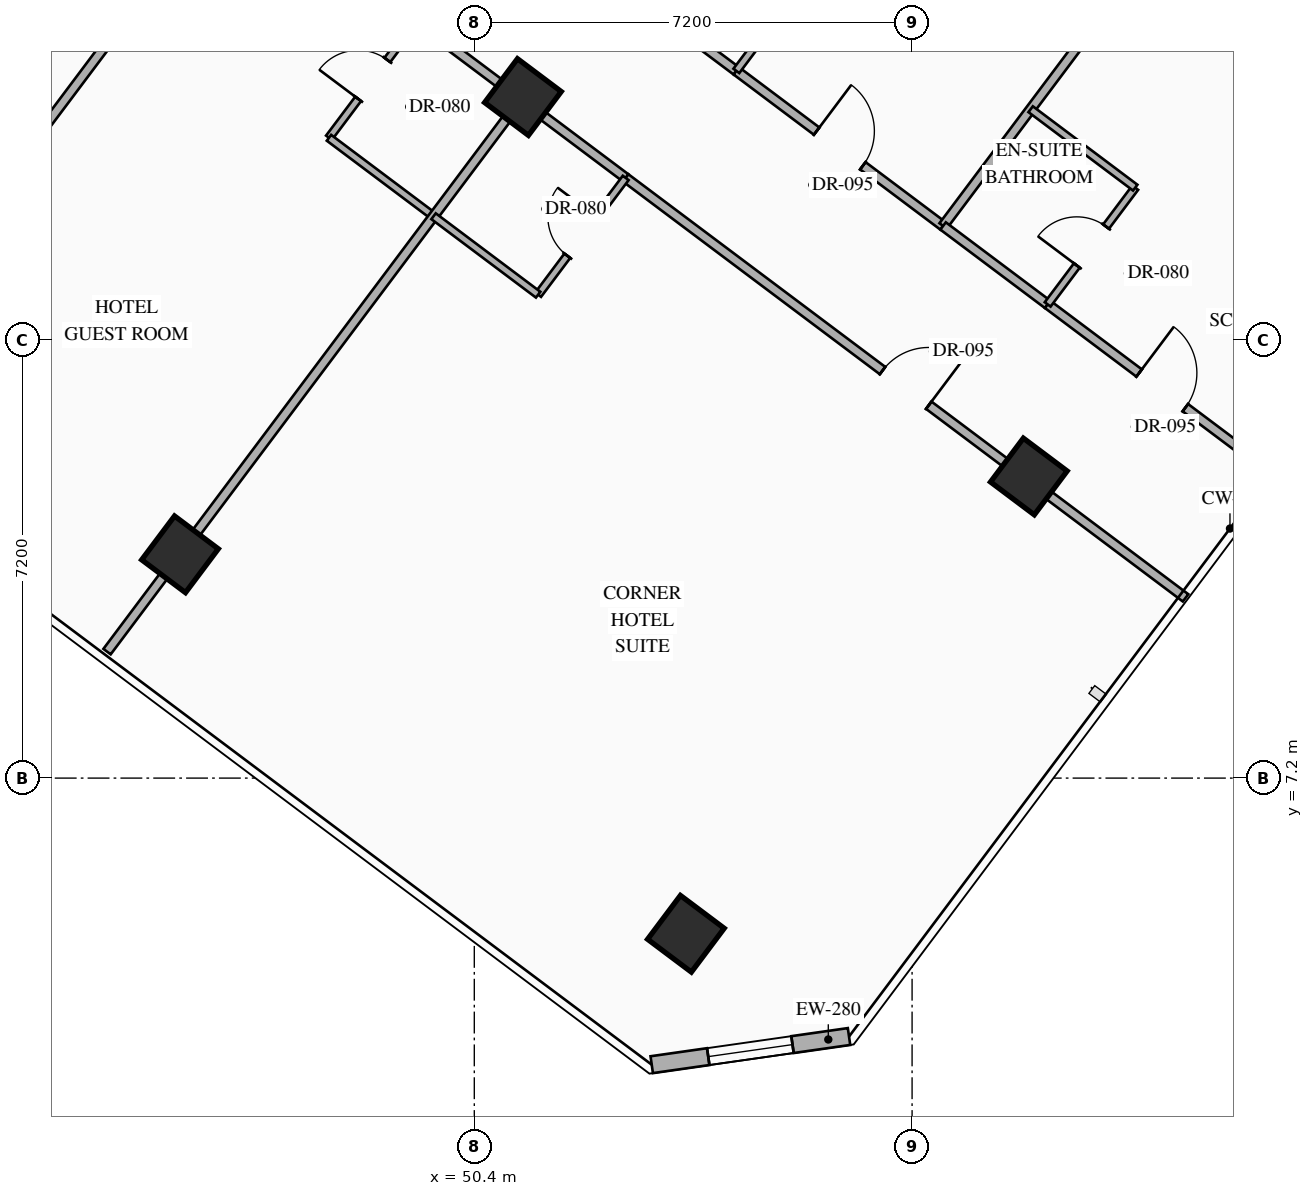
"""IFC4 building model, lengths in metres.
Left out: names, types, materials, properties, quantities, classifications, styles, units other than length and angle.
Written with IfcOpenShell. Run it as: python <this file> out.ifc"""

import sys

from ifc_helpers import new_model, si_unit, direction, frame, frame_2d, origin, origin_2d, place, context, subcontext, project, spatial, rectangle, hollow_rectangle, extrude, element, fill, save


model = new_model("IFC4")
c1 = context("Model", 3, precision=1e-05, world=origin(), true_north=direction((0.0, 1.0)))
c2 = subcontext(c1, "Body", "Model", "MODEL_VIEW")
j1 = project(units=[si_unit("LENGTHUNIT", "METRE"), si_unit("PLANEANGLEUNIT", "RADIAN")], contexts=[c1])
p1 = place(None, origin())
s1 = spatial("IfcSite", under=j1, at=p1, CompositionType="ELEMENT")
p2 = place(p1, origin())
s2 = spatial("IfcBuilding", under=s1, at=p2, CompositionType="ELEMENT")
p3 = place(p2, frame((0.0, 0.0, 70.1)))
s3 = spatial("IfcBuildingStorey", under=s2, at=p3, CompositionType="ELEMENT", Elevation=70.1)
for number, where, z_axis, x_axis in (
    (1, (45.56, 10.88, 0.0), (0.0, 0.0, 1.0), (0.8, -0.6, 0.0)),
    (2, (51.2, 18.4, 0.0), (0.0, 0.0, 1.0), (0.8, -0.6, 0.0)),
    (3, (53.88, 4.64, 0.0), (0.0, 0.0, 1.0), (0.8, -0.6, 0.0)),
    (4, (59.52, 12.16, 0.0), (0.0, 0.0, 1.0), (0.8, -0.6, 0.0)),
):
    element("IfcColumn", number, at=place(p3, frame(where, z_axis=z_axis, x_axis=x_axis)), inside=s3, PredefinedType="COLUMN", context=c2, shape_type="SweptSolid", body=[
        extrude(hollow_rectangle(XDim=0.9, YDim=0.9, WallThickness=0.036, at=origin_2d()), origin(), (0.0, 0.0, 1.0), 4.5),
    ])
p4 = place(p3, frame((56.563, 2.95, 0.0), z_axis=(0.0, 0.0, 1.0), x_axis=(-0.989977778067, -0.141223223777, 0.0)))
e5 = element("IfcWall", 5, at=p4, inside=s3, PredefinedType="STANDARD", context=c2, shape_type="SweptSolid", body=[
    extrude(rectangle(XDim=3.278, YDim=0.28, at=frame_2d((1.639, 0.0))), origin(), (0.0, 0.0, 1.0), 4.28),
])
p5 = place(p4, frame((0.939, 0.0, 0.85)))
e6 = element("IfcOpeningElement", 6, at=p5, cuts=e5, PredefinedType="OPENING", context=c2, shape_type="SweptSolid", body=[
    extrude(rectangle(XDim=1.4, YDim=1.8, at=frame_2d((0.7, 0.9))), frame((0.0, 0.15, 0.0), z_axis=(0.0, -1.0, 0.0), x_axis=(1.0, 0.0, 0.0)), (0.0, 0.0, 1.0), 0.3),
])
p6 = place(p3, frame((39.464, 12.752, 0.0), z_axis=(0.0, 0.0, 1.0), x_axis=(0.6, 0.8, 0.0)))
e7 = element("IfcWall", 7, at=p6, inside=s3, PredefinedType="PARTITIONING", context=c2, shape_type="SweptSolid", body=[
    extrude(rectangle(XDim=11.51, YDim=0.15, at=frame_2d((5.755, 0.0))), origin(), (0.0, 0.0, 1.0), 4.28),
])
p7 = place(p3, frame((52.99, 20.12, 0.0), z_axis=(0.0, 0.0, 1.0), x_axis=(0.79998637334, -0.60001816845, 0.0)))
e8 = element("IfcWall", 8, at=p7, inside=s3, PredefinedType="PARTITIONING", context=c2, shape_type="SweptSolid", body=[
    extrude(rectangle(XDim=2.15, YDim=0.15, at=frame_2d((1.075, 0.0))), origin(), (0.0, 0.0, 1.0), 3.925),
])
p8 = place(p3, frame((54.71, 18.83, 0.0), z_axis=(0.0, 0.0, 1.0), x_axis=(0.800006893092, -0.599990809101, 0.0)))
e9 = element("IfcWall", 9, at=p8, inside=s3, PredefinedType="PARTITIONING", context=c2, shape_type="SweptSolid", body=[
    extrude(rectangle(XDim=4.25, YDim=0.15, at=frame_2d((2.125, 0.0))), origin(), (0.0, 0.0, 1.0), 3.925),
])
p9 = place(p8, frame((1.65, 0.0, 0.0)))
e10 = element("IfcOpeningElement", 10, at=p9, cuts=e9, PredefinedType="OPENING", context=c2, shape_type="SweptSolid", body=[
    extrude(rectangle(XDim=0.95, YDim=2.15, at=frame_2d((0.475, 1.075))), frame((0.0, 0.085, 0.0), z_axis=(0.0, -1.0, 0.0), x_axis=(1.0, 0.0, 0.0)), (0.0, 0.0, 1.0), 0.17),
])
p10 = place(p3, frame((54.71, 18.83, 0.0), z_axis=(0.0, 0.0, 1.0), x_axis=(0.6, 0.8, 0.0)))
e11 = element("IfcWall", 11, at=p10, inside=s3, PredefinedType="PARTITIONING", context=c2, shape_type="SweptSolid", body=[
    extrude(rectangle(XDim=2.4, YDim=0.12, at=frame_2d((1.2, 0.0))), origin(), (0.0, 0.0, 1.0), 4.28),
])
p11 = place(p10, frame((0.8, 0.0, 0.0)))
e12 = element("IfcOpeningElement", 12, at=p11, cuts=e11, PredefinedType="OPENING", context=c2, shape_type="SweptSolid", body=[
    extrude(rectangle(XDim=0.8, YDim=2.06, at=frame_2d((0.4, 1.03))), frame((0.0, 0.07, 0.0), z_axis=(0.0, -1.0, 0.0), x_axis=(1.0, 0.0, 0.0)), (0.0, 0.0, 1.0), 0.14),
])
p12 = place(p3, frame((58.11, 16.28, 0.0), z_axis=(0.0, 0.0, 1.0), x_axis=(0.599996617946, 0.80000253653, 0.0)))
e13 = element("IfcWall", 13, at=p12, inside=s3, PredefinedType="PARTITIONING", context=c2, shape_type="SweptSolid", body=[
    extrude(rectangle(XDim=11.55, YDim=0.15, at=frame_2d((5.775, 0.0))), origin(), (0.0, 0.0, 1.0), 4.28),
])
p13 = place(p3, frame((58.11, 16.28, 0.0), z_axis=(0.0, 0.0, 1.0), x_axis=(0.79998637334, -0.60001816845, 0.0)))
e14 = element("IfcWall", 14, at=p13, inside=s3, PredefinedType="PARTITIONING", context=c2, shape_type="SweptSolid", body=[
    extrude(rectangle(XDim=2.15, YDim=0.15, at=frame_2d((1.075, 0.0))), origin(), (0.0, 0.0, 1.0), 3.925),
])
p14 = place(p3, frame((59.83, 14.99, 0.0), z_axis=(0.0, 0.0, 1.0), x_axis=(0.799993779569, -0.600008293819, 0.0)))
e15 = element("IfcWall", 15, at=p14, inside=s3, PredefinedType="PARTITIONING", context=c2, shape_type="SweptSolid", body=[
    extrude(rectangle(XDim=4.71, YDim=0.15, at=frame_2d((2.355, 0.0))), origin(), (0.0, 0.0, 1.0), 3.925),
])
p15 = place(p14, frame((1.88, 0.0, 0.0)))
e16 = element("IfcOpeningElement", 16, at=p15, cuts=e15, PredefinedType="OPENING", context=c2, shape_type="SweptSolid", body=[
    extrude(rectangle(XDim=0.95, YDim=2.15, at=frame_2d((0.475, 1.075))), frame((0.0, 0.085, 0.0), z_axis=(0.0, -1.0, 0.0), x_axis=(1.0, 0.0, 0.0)), (0.0, 0.0, 1.0), 0.17),
])
p16 = place(p3, frame((59.83, 14.99, 0.0), z_axis=(0.0, 0.0, 1.0), x_axis=(0.6, 0.8, 0.0)))
e17 = element("IfcWall", 17, at=p16, inside=s3, PredefinedType="PARTITIONING", context=c2, shape_type="SweptSolid", body=[
    extrude(rectangle(XDim=2.4, YDim=0.12, at=frame_2d((1.2, 0.0))), origin(), (0.0, 0.0, 1.0), 4.28),
])
p17 = place(p16, frame((0.8, 0.0, 0.0)))
e18 = element("IfcOpeningElement", 18, at=p17, cuts=e17, PredefinedType="OPENING", context=c2, shape_type="SweptSolid", body=[
    extrude(rectangle(XDim=0.8, YDim=2.06, at=frame_2d((0.4, 1.03))), frame((0.0, 0.07, 0.0), z_axis=(0.0, -1.0, 0.0), x_axis=(1.0, 0.0, 0.0)), (0.0, 0.0, 1.0), 0.14),
])
p18 = place(p3, frame((59.55, 18.2, 0.0), z_axis=(0.0, 0.0, 1.0), x_axis=(0.79998637334, -0.60001816845, 0.0)))
e19 = element("IfcWall", 19, at=p18, inside=s3, PredefinedType="PARTITIONING", context=c2, shape_type="SweptSolid", body=[
    extrude(rectangle(XDim=2.15, YDim=0.12, at=frame_2d((1.075, 0.0))), origin(), (0.0, 0.0, 1.0), 4.28),
])
p19 = place(p3, frame((49.45, 19.65, 0.0), z_axis=(0.0, 0.0, 1.0), x_axis=(0.800040880289, -0.59994548908, 0.0)))
e20 = element("IfcWall", 20, at=p19, inside=s3, PredefinedType="PARTITIONING", context=c2, shape_type="SweptSolid", body=[
    extrude(rectangle(XDim=2.15, YDim=0.15, at=frame_2d((1.075, 0.0))), origin(), (0.0, 0.0, 1.0), 3.475),
])
p20 = place(p3, frame((48.01, 17.73, 0.0), z_axis=(0.0, 0.0, 1.0), x_axis=(0.6, 0.8, 0.0)))
e21 = element("IfcWall", 21, at=p20, inside=s3, PredefinedType="PARTITIONING", context=c2, shape_type="SweptSolid", body=[
    extrude(rectangle(XDim=2.4, YDim=0.12, at=frame_2d((1.2, 0.0))), origin(), (0.0, 0.0, 1.0), 4.28),
])
p21 = place(p20, frame((0.8, 0.0, 0.0)))
e22 = element("IfcOpeningElement", 22, at=p21, cuts=e21, PredefinedType="OPENING", context=c2, shape_type="SweptSolid", body=[
    extrude(rectangle(XDim=0.8, YDim=2.06, at=frame_2d((0.4, 1.03))), frame((0.0, 0.07, 0.0), z_axis=(0.0, -1.0, 0.0), x_axis=(1.0, 0.0, 0.0)), (0.0, 0.0, 1.0), 0.14),
])
p22 = place(p3, frame((48.01, 17.73, 0.0), z_axis=(0.0, 0.0, 1.0), x_axis=(0.79998637334, -0.60001816845, 0.0)))
e23 = element("IfcWall", 23, at=p22, inside=s3, PredefinedType="PARTITIONING", context=c2, shape_type="SweptSolid", body=[
    extrude(rectangle(XDim=2.15, YDim=0.12, at=frame_2d((1.075, 0.0))), origin(), (0.0, 0.0, 1.0), 4.28),
])
p23 = place(p3, frame((44.36, 9.28, 0.0), z_axis=(0.0, 0.0, 1.0), x_axis=(0.599986233332, 0.800010324816, 0.0)))
e24 = element("IfcWall", 24, at=p23, inside=s3, PredefinedType="PARTITIONING", context=c2, shape_type="SweptSolid", body=[
    extrude(rectangle(XDim=11.35, YDim=0.15, at=frame_2d((5.675, 0.0))), origin(), (0.0, 0.0, 1.0), 3.475),
])
p24 = place(p3, frame((51.17, 18.36, 0.0), z_axis=(0.0, 0.0, 1.0), x_axis=(0.79998637334, -0.60001816845, 0.0)))
e25 = element("IfcWall", 25, at=p24, inside=s3, PredefinedType="PARTITIONING", context=c2, shape_type="SweptSolid", body=[
    extrude(rectangle(XDim=2.15, YDim=0.15, at=frame_2d((1.075, 0.0))), origin(), (0.0, 0.0, 1.0), 3.475),
])
p25 = place(p3, frame((52.89, 17.07, 0.0), z_axis=(0.0, 0.0, 1.0), x_axis=(0.8, -0.6, 0.0)))
e26 = element("IfcWall", 26, at=p25, inside=s3, PredefinedType="PARTITIONING", context=c2, shape_type="SweptSolid", body=[
    extrude(rectangle(XDim=11.51, YDim=0.15, at=frame_2d((5.755, 0.0))), origin(), (0.0, 0.0, 1.0), 3.475),
])
p26 = place(p25, frame((5.28, 0.0, 0.0)))
e27 = element("IfcOpeningElement", 27, at=p26, cuts=e26, PredefinedType="OPENING", context=c2, shape_type="SweptSolid", body=[
    extrude(rectangle(XDim=0.95, YDim=2.15, at=frame_2d((0.475, 1.075))), frame((0.0, 0.085, 0.0), z_axis=(0.0, -1.0, 0.0), x_axis=(1.0, 0.0, 0.0)), (0.0, 0.0, 1.0), 0.17),
])
p27 = place(p3, frame((51.45, 15.15, 0.0), z_axis=(0.0, 0.0, 1.0), x_axis=(0.599951172744, 0.800036618114, 0.0)))
e28 = element("IfcWall", 28, at=p27, inside=s3, PredefinedType="PARTITIONING", context=c2, shape_type="SweptSolid", body=[
    extrude(rectangle(XDim=2.4, YDim=0.12, at=frame_2d((1.2, 0.0))), origin(), (0.0, 0.0, 1.0), 4.28),
])
p28 = place(p27, frame((0.8, 0.0, 0.0)))
e29 = element("IfcOpeningElement", 29, at=p28, cuts=e28, PredefinedType="OPENING", context=c2, shape_type="SweptSolid", body=[
    extrude(rectangle(XDim=0.8, YDim=2.06, at=frame_2d((0.4, 1.03))), frame((0.0, 0.07, 0.0), z_axis=(0.0, -1.0, 0.0), x_axis=(1.0, 0.0, 0.0)), (0.0, 0.0, 1.0), 0.14),
])
p29 = place(p3, frame((49.73, 16.44, 0.0), z_axis=(0.0, 0.0, 1.0), x_axis=(0.79998637334, -0.60001816845, 0.0)))
e30 = element("IfcWall", 30, at=p29, inside=s3, PredefinedType="PARTITIONING", context=c2, shape_type="SweptSolid", body=[
    extrude(rectangle(XDim=2.15, YDim=0.12, at=frame_2d((1.075, 0.0))), origin(), (0.0, 0.0, 1.0), 4.28),
])
p30 = place(p5, origin())
e31 = element("IfcWindow", 31, at=p30, inside=s3, PartitioningType="SINGLE_PANEL", PredefinedType="WINDOW", context=c2, shape_type="SweptSolid", body=[
    extrude(rectangle(XDim=1.4, YDim=1.8, at=frame_2d((0.7, 0.9))), frame((0.0, 0.03, 0.0), z_axis=(0.0, -1.0, 0.0), x_axis=(1.0, 0.0, 0.0)), (0.0, 0.0, 1.0), 0.06),
])
fill(e6, e31)
p31 = place(p9, origin())
e32 = element("IfcDoor", 32, at=p31, inside=s3, OperationType="SINGLE_SWING_LEFT", PredefinedType="DOOR", context=c2, shape_type="SweptSolid", body=[
    extrude(rectangle(XDim=0.95, YDim=2.15, at=frame_2d((0.475, 1.075))), frame((0.0, 0.025, 0.0), z_axis=(0.0, -1.0, 0.0), x_axis=(1.0, 0.0, 0.0)), (0.0, 0.0, 1.0), 0.05),
])
fill(e10, e32)
p32 = place(p15, origin())
e33 = element("IfcDoor", 33, at=p32, inside=s3, OperationType="SINGLE_SWING_LEFT", PredefinedType="DOOR", context=c2, shape_type="SweptSolid", body=[
    extrude(rectangle(XDim=0.95, YDim=2.15, at=frame_2d((0.475, 1.075))), frame((0.0, 0.025, 0.0), z_axis=(0.0, -1.0, 0.0), x_axis=(1.0, 0.0, 0.0)), (0.0, 0.0, 1.0), 0.05),
])
fill(e16, e33)
p33 = place(p17, origin())
e34 = element("IfcDoor", 34, at=p33, inside=s3, OperationType="SINGLE_SWING_LEFT", PredefinedType="DOOR", context=c2, shape_type="SweptSolid", body=[
    extrude(rectangle(XDim=0.8, YDim=2.06, at=frame_2d((0.4, 1.03))), frame((0.0, 0.025, 0.0), z_axis=(0.0, -1.0, 0.0), x_axis=(1.0, 0.0, 0.0)), (0.0, 0.0, 1.0), 0.05),
])
fill(e18, e34)
p34 = place(p21, origin())
e35 = element("IfcDoor", 35, at=p34, inside=s3, OperationType="SINGLE_SWING_LEFT", PredefinedType="DOOR", context=c2, shape_type="SweptSolid", body=[
    extrude(rectangle(XDim=0.8, YDim=2.06, at=frame_2d((0.4, 1.03))), frame((0.0, 0.025, 0.0), z_axis=(0.0, -1.0, 0.0), x_axis=(1.0, 0.0, 0.0)), (0.0, 0.0, 1.0), 0.05),
])
fill(e22, e35)
p35 = place(p26, origin())
e36 = element("IfcDoor", 36, at=p35, inside=s3, OperationType="SINGLE_SWING_RIGHT", PredefinedType="DOOR", context=c2, shape_type="SweptSolid", body=[
    extrude(rectangle(XDim=0.95, YDim=2.15, at=frame_2d((0.475, 1.075))), frame((0.0, 0.025, 0.0), z_axis=(0.0, -1.0, 0.0), x_axis=(1.0, 0.0, 0.0)), (0.0, 0.0, 1.0), 0.05),
])
fill(e27, e36)
p36 = place(p28, origin())
e37 = element("IfcDoor", 37, at=p36, inside=s3, OperationType="SINGLE_SWING_RIGHT", PredefinedType="DOOR", context=c2, shape_type="SweptSolid", body=[
    extrude(rectangle(XDim=0.8, YDim=2.06, at=frame_2d((0.4, 1.03))), frame((0.0, 0.025, 0.0), z_axis=(0.0, -1.0, 0.0), x_axis=(1.0, 0.0, 0.0)), (0.0, 0.0, 1.0), 0.05),
])
fill(e29, e37)
save(model, sys.argv[1])
